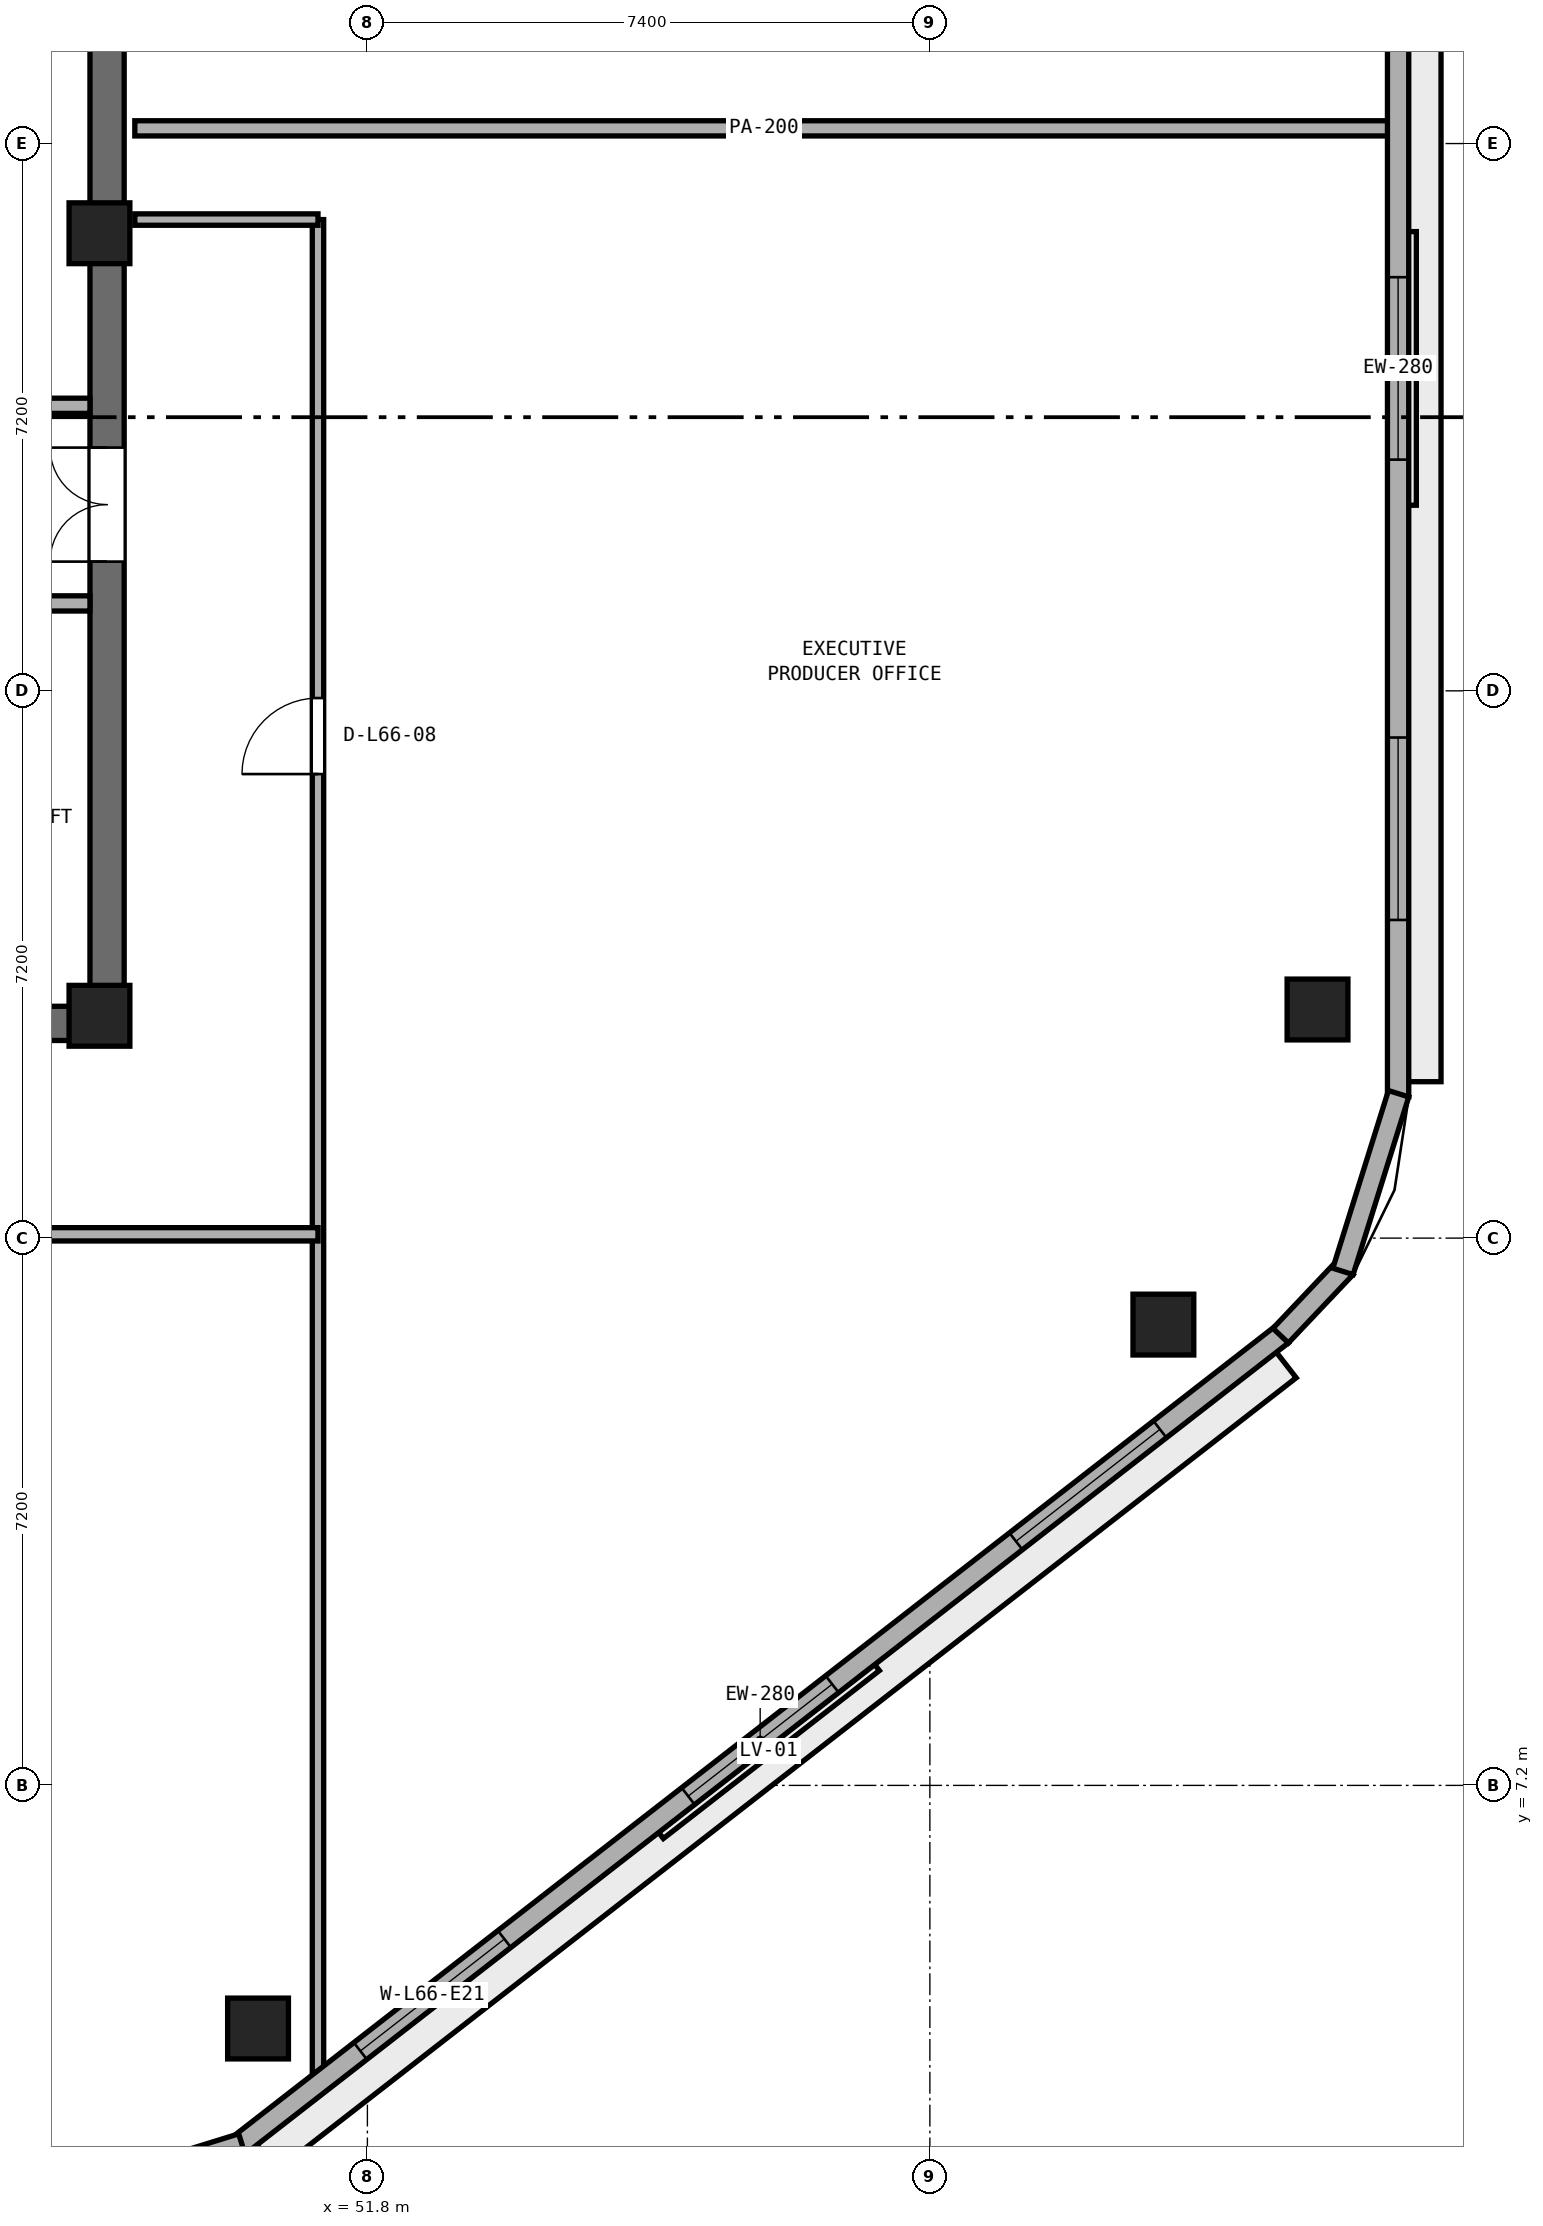
"""IFC4 building model, lengths in metres.
Left out: names, types, materials, properties, quantities, classifications, styles, units other than length and angle.
Written with IfcOpenShell. Run it as: python <this file> out.ifc"""

import sys

from ifc_helpers import new_model, si_unit, direction, frame, frame_2d, origin, origin_2d, place, context, subcontext, project, spatial, rectangle, extrude, element, fill, save


model = new_model("IFC4")
c1 = context("Model", 3, precision=1e-05, world=origin(), true_north=direction((0.0, 1.0)))
c2 = subcontext(c1, "Body", "Model", "MODEL_VIEW")
j1 = project(units=[si_unit("LENGTHUNIT", "METRE"), si_unit("PLANEANGLEUNIT", "RADIAN")], contexts=[c1])
p1 = place(None, origin())
s1 = spatial("IfcSite", under=j1, at=p1, CompositionType="ELEMENT")
p2 = place(p1, origin())
s2 = spatial("IfcBuilding", under=s1, at=p2, CompositionType="ELEMENT")
p3 = place(p2, frame((0.0, 0.0, 259.2)))
s3 = spatial("IfcBuildingStorey", under=s2, at=p3, CompositionType="ELEMENT", Elevation=259.2)
p4 = place(p3, frame((25.4, 17.225, 0.0), z_axis=(0.0, 0.0, 1.0), x_axis=(1.0, 0.0, 0.0)))
e1 = element("IfcWall", 1, at=p4, inside=s3, PredefinedType="SHEAR", context=c2, shape_type="SweptSolid", body=[
    extrude(rectangle(XDim=23.2, YDim=0.45, at=frame_2d((11.6, 0.0))), origin(), (0.0, 0.0, 1.0), 3.51),
])
p5 = place(p3, frame((48.375, 17.45, 0.0), z_axis=(0.0, 0.0, 1.0), x_axis=(0.0, 1.0, 0.0)))
e2 = element("IfcWall", 2, at=p5, inside=s3, PredefinedType="SHEAR", context=c2, shape_type="SweptSolid", body=[
    extrude(rectangle(XDim=15.5, YDim=0.45, at=frame_2d((7.75, 0.0))), origin(), (0.0, 0.0, 1.0), 3.51),
])
p6 = place(p5, frame((5.85, 0.0, 0.0)))
e3 = element("IfcOpeningElement", 3, at=p6, cuts=e2, PredefinedType="OPENING", context=c2, shape_type="SweptSolid", body=[
    extrude(rectangle(XDim=1.5, YDim=2.15, at=frame_2d((0.75, 1.075))), frame((0.0, 0.235, 0.0), z_axis=(0.0, -1.0, 0.0), x_axis=(1.0, 0.0, 0.0)), (0.0, 0.0, 1.0), 0.47),
])
for number, where, z_axis, x_axis in (
    (4, (48.275, 17.325, 0.0), (0.0, 0.0, 1.0), (1.0, 0.0, 0.0)),
    (5, (48.275, 27.62, 0.0), (0.0, 0.0, 1.0), (1.0, 0.0, 0.0)),
):
    element("IfcColumn", number, at=place(p3, frame(where, z_axis=z_axis, x_axis=x_axis)), inside=s3, PredefinedType="PILASTER", context=c2, shape_type="SweptSolid", body=[
        extrude(rectangle(XDim=0.8, YDim=0.8, at=origin_2d()), origin(), (0.0, 0.0, 1.0), 3.8),
    ])
for number, where, z_axis, x_axis in (
    (6, (50.361, 4.002, 0.0), (0.0, 0.0, 1.0), (1.0, 0.0, 0.0)),
    (7, (62.272, 13.262, 0.0), (0.0, 0.0, 1.0), (1.0, 0.0, 0.0)),
    (8, (64.3, 17.408, 0.0), (0.0, 0.0, 1.0), (1.0, 0.0, 0.0)),
):
    element("IfcColumn", number, at=place(p3, frame(where, z_axis=z_axis, x_axis=x_axis)), inside=s3, PredefinedType="COLUMN", context=c2, shape_type="SweptSolid", body=[
        extrude(rectangle(XDim=0.8, YDim=0.8, at=origin_2d()), origin(), (0.0, 0.0, 1.0), 3.8),
    ])
p7 = place(p3, frame((42.0, 22.75, 0.0), z_axis=(0.0, 0.0, 1.0), x_axis=(1.0, 0.0, 0.0)))
e9 = element("IfcWall", 9, at=p7, inside=s3, PredefinedType="SOLIDWALL", context=c2, shape_type="SweptSolid", body=[
    extrude(rectangle(XDim=6.15, YDim=0.2, at=frame_2d((3.075, 0.0))), origin(), (0.0, 0.0, 1.0), 3.51),
])
p8 = place(p3, frame((46.1, 25.35, 0.0), z_axis=(0.0, 0.0, 1.0), x_axis=(1.0, 0.0, 0.0)))
e10 = element("IfcWall", 10, at=p8, inside=s3, PredefinedType="SOLIDWALL", context=c2, shape_type="SweptSolid", body=[
    extrude(rectangle(XDim=2.05, YDim=0.2, at=frame_2d((1.025, 0.0))), origin(), (0.0, 0.0, 1.0), 3.51),
])
p9 = place(p3, frame((51.15, 3.235, 0.0), z_axis=(0.0, 0.0, 1.0), x_axis=(0.0, 1.0, 0.0)))
e11 = element("IfcWall", 11, at=p9, inside=s3, PredefinedType="PARTITIONING", context=c2, shape_type="SweptSolid", body=[
    extrude(rectangle(XDim=24.565, YDim=0.15, at=frame_2d((12.283, 0.0))), origin(), (0.0, 0.0, 1.0), 3.51),
])
p10 = place(p9, frame((17.27, 0.0, 0.0)))
e12 = element("IfcOpeningElement", 12, at=p10, cuts=e11, PredefinedType="OPENING", context=c2, shape_type="SweptSolid", body=[
    extrude(rectangle(XDim=1.0, YDim=2.12, at=frame_2d((0.5, 1.06))), frame((0.0, 0.085, 0.0), z_axis=(0.0, -1.0, 0.0), x_axis=(1.0, 0.0, 0.0)), (0.0, 0.0, 1.0), 0.17),
])
p11 = place(p3, frame((38.35, 14.45, 0.0), z_axis=(0.0, 0.0, 1.0), x_axis=(1.0, 0.0, 0.0)))
e13 = element("IfcWall", 13, at=p11, inside=s3, PredefinedType="PARTITIONING", context=c2, shape_type="SweptSolid", body=[
    extrude(rectangle(XDim=12.8, YDim=0.175, at=frame_2d((6.4, 0.0))), origin(), (0.0, 0.0, 1.0), 3.51),
])
p12 = place(p11, frame((5.9, 0.0, 0.0)))
e14 = element("IfcOpeningElement", 14, at=p12, cuts=e13, PredefinedType="OPENING", context=c2, shape_type="SweptSolid", body=[
    extrude(rectangle(XDim=1.0, YDim=2.12, at=frame_2d((0.5, 1.06))), frame((0.0, 0.097, 0.0), z_axis=(0.0, -1.0, 0.0), x_axis=(1.0, 0.0, 0.0)), (0.0, 0.0, 1.0), 0.195),
])
p13 = place(p3, frame((48.74, 27.8, 0.0), z_axis=(0.0, 0.0, 1.0), x_axis=(1.0, 0.0, 0.0)))
e15 = element("IfcWall", 15, at=p13, inside=s3, PredefinedType="PARTITIONING", context=c2, shape_type="SweptSolid", body=[
    extrude(rectangle(XDim=2.41, YDim=0.15, at=frame_2d((1.205, 0.0))), origin(), (0.0, 0.0, 1.0), 3.51),
])
p14 = place(p3, frame((48.74, 29.0, 0.0), z_axis=(0.0, 0.0, 1.0), x_axis=(1.0, 0.0, 0.0)))
e16 = element("IfcWall", 16, at=p14, inside=s3, PredefinedType="PARTITIONING", context=c2, shape_type="SweptSolid", body=[
    extrude(rectangle(XDim=16.555, YDim=0.2, at=frame_2d((8.277, 0.0))), origin(), (0.0, 0.0, 1.0), 3.51),
])
p15 = place(p3, frame((50.104, 2.459, 0.0), z_axis=(0.0, 0.0, 1.0), x_axis=(0.789464857485, 0.613795763097, 0.0)))
e17 = element("IfcWall", 17, at=p15, inside=s3, PredefinedType="STANDARD", context=c2, shape_type="SweptSolid", body=[
    extrude(rectangle(XDim=17.387, YDim=0.28, at=frame_2d((8.694, 0.0))), origin(), (0.0, 0.0, 1.0), 3.51),
])
p16 = place(p15, frame((2.031, 0.0, 0.9)))
e18 = element("IfcOpeningElement", 18, at=p16, cuts=e17, PredefinedType="OPENING", context=c2, shape_type="SweptSolid", body=[
    extrude(rectangle(XDim=2.4, YDim=1.75, at=frame_2d((1.2, 0.875))), frame((0.0, 0.15, 0.0), z_axis=(0.0, -1.0, 0.0), x_axis=(1.0, 0.0, 0.0)), (0.0, 0.0, 1.0), 0.3),
])
p17 = place(p15, frame((7.494, 0.0, 0.9)))
e19 = element("IfcOpeningElement", 19, at=p17, cuts=e17, PredefinedType="OPENING", context=c2, shape_type="SweptSolid", body=[
    extrude(rectangle(XDim=2.4, YDim=1.75, at=frame_2d((1.2, 0.875))), frame((0.0, 0.15, 0.0), z_axis=(0.0, -1.0, 0.0), x_axis=(1.0, 0.0, 0.0)), (0.0, 0.0, 1.0), 0.3),
])
p18 = place(p15, frame((12.956, 0.0, 0.9)))
e20 = element("IfcOpeningElement", 20, at=p18, cuts=e17, PredefinedType="OPENING", context=c2, shape_type="SweptSolid", body=[
    extrude(rectangle(XDim=2.4, YDim=1.75, at=frame_2d((1.2, 0.875))), frame((0.0, 0.15, 0.0), z_axis=(0.0, -1.0, 0.0), x_axis=(1.0, 0.0, 0.0)), (0.0, 0.0, 1.0), 0.3),
])
p19 = place(p3, frame((65.36, 16.258, 0.0), z_axis=(0.0, 0.0, 1.0), x_axis=(0.0, 1.0, 0.0)))
e21 = element("IfcWall", 21, at=p19, inside=s3, PredefinedType="STANDARD", context=c2, shape_type="SweptSolid", body=[
    extrude(rectangle(XDim=19.168, YDim=0.28, at=frame_2d((9.584, 0.0))), origin(), (0.0, 0.0, 1.0), 3.51),
])
p20 = place(p19, frame((2.328, 0.0, 0.9)))
e22 = element("IfcOpeningElement", 22, at=p20, cuts=e21, PredefinedType="OPENING", context=c2, shape_type="SweptSolid", body=[
    extrude(rectangle(XDim=2.4, YDim=1.75, at=frame_2d((1.2, 0.875))), frame((0.0, 0.15, 0.0), z_axis=(0.0, -1.0, 0.0), x_axis=(1.0, 0.0, 0.0)), (0.0, 0.0, 1.0), 0.3),
])
p21 = place(p19, frame((8.384, 0.0, 0.9)))
e23 = element("IfcOpeningElement", 23, at=p21, cuts=e21, PredefinedType="OPENING", context=c2, shape_type="SweptSolid", body=[
    extrude(rectangle(XDim=2.4, YDim=1.75, at=frame_2d((1.2, 0.875))), frame((0.0, 0.15, 0.0), z_axis=(0.0, -1.0, 0.0), x_axis=(1.0, 0.0, 0.0)), (0.0, 0.0, 1.0), 0.3),
])
p22 = place(p19, frame((14.44, 0.0, 0.9)))
e24 = element("IfcOpeningElement", 24, at=p22, cuts=e21, PredefinedType="OPENING", context=c2, shape_type="SweptSolid", body=[
    extrude(rectangle(XDim=2.4, YDim=1.75, at=frame_2d((1.2, 0.875))), frame((0.0, 0.15, 0.0), z_axis=(0.0, -1.0, 0.0), x_axis=(1.0, 0.0, 0.0)), (0.0, 0.0, 1.0), 0.3),
])
p23 = place(p3, frame((47.386, 1.626, 0.0), z_axis=(0.0, 0.0, 1.0), x_axis=(0.955189316149, 0.29599555793, 0.0)))
e25 = element("IfcWall", 25, at=p23, inside=s3, PredefinedType="STANDARD", context=c2, shape_type="SweptSolid", body=[
    extrude(rectangle(XDim=2.892, YDim=0.28, at=frame_2d((1.446, 0.0))), origin(), (0.0, 0.0, 1.0), 3.51),
])
p24 = place(p3, frame((63.815, 13.117, 0.0), z_axis=(0.0, 0.0, 1.0), x_axis=(0.687733716128, 0.725963040176, 0.0)))
e26 = element("IfcWall", 26, at=p24, inside=s3, PredefinedType="STANDARD", context=c2, shape_type="SweptSolid", body=[
    extrude(rectangle(XDim=1.239, YDim=0.28, at=frame_2d((0.62, 0.0))), origin(), (0.0, 0.0, 1.0), 3.51),
])
p25 = place(p3, frame((64.635, 13.962, 0.0), z_axis=(0.0, 0.0, 1.0), x_axis=(0.298649578722, 0.954362839348, 0.0)))
e27 = element("IfcWall", 27, at=p25, inside=s3, PredefinedType="STANDARD", context=c2, shape_type="SweptSolid", body=[
    extrude(rectangle(XDim=2.449, YDim=0.28, at=frame_2d((1.225, 0.0))), origin(), (0.0, 0.0, 1.0), 3.51),
])
p26 = place(p6, origin())
e28 = element("IfcDoor", 28, at=p26, inside=s3, OperationType="DOUBLE_DOOR_SINGLE_SWING", PredefinedType="DOOR", context=c2, shape_type="SweptSolid", body=[
    extrude(rectangle(XDim=1.5, YDim=2.15, at=frame_2d((0.75, 1.075))), frame((0.0, 0.025, 0.0), z_axis=(0.0, -1.0, 0.0), x_axis=(1.0, 0.0, 0.0)), (0.0, 0.0, 1.0), 0.05),
])
fill(e3, e28)
p27 = place(p10, origin())
e29 = element("IfcDoor", 29, at=p27, inside=s3, OperationType="SINGLE_SWING_LEFT", PredefinedType="DOOR", context=c2, shape_type="SweptSolid", body=[
    extrude(rectangle(XDim=1.0, YDim=2.12, at=frame_2d((0.5, 1.06))), frame((0.0, 0.025, 0.0), z_axis=(0.0, -1.0, 0.0), x_axis=(1.0, 0.0, 0.0)), (0.0, 0.0, 1.0), 0.05),
])
fill(e12, e29)
p28 = place(p16, origin())
e30 = element("IfcWindow", 30, at=p28, inside=s3, PartitioningType="SINGLE_PANEL", PredefinedType="WINDOW", context=c2, shape_type="SweptSolid", body=[
    extrude(rectangle(XDim=2.4, YDim=1.75, at=frame_2d((1.2, 0.875))), frame((0.0, 0.03, 0.0), z_axis=(0.0, -1.0, 0.0), x_axis=(1.0, 0.0, 0.0)), (0.0, 0.0, 1.0), 0.06),
])
fill(e18, e30)
p29 = place(p17, origin())
e31 = element("IfcWindow", 31, at=p29, inside=s3, PartitioningType="SINGLE_PANEL", PredefinedType="WINDOW", context=c2, shape_type="SweptSolid", body=[
    extrude(rectangle(XDim=2.4, YDim=1.75, at=frame_2d((1.2, 0.875))), frame((0.0, 0.03, 0.0), z_axis=(0.0, -1.0, 0.0), x_axis=(1.0, 0.0, 0.0)), (0.0, 0.0, 1.0), 0.06),
])
fill(e19, e31)
p30 = place(p18, origin())
e32 = element("IfcWindow", 32, at=p30, inside=s3, PartitioningType="SINGLE_PANEL", PredefinedType="WINDOW", context=c2, shape_type="SweptSolid", body=[
    extrude(rectangle(XDim=2.4, YDim=1.75, at=frame_2d((1.2, 0.875))), frame((0.0, 0.03, 0.0), z_axis=(0.0, -1.0, 0.0), x_axis=(1.0, 0.0, 0.0)), (0.0, 0.0, 1.0), 0.06),
])
fill(e20, e32)
p31 = place(p20, origin())
e33 = element("IfcWindow", 33, at=p31, inside=s3, PartitioningType="SINGLE_PANEL", PredefinedType="WINDOW", context=c2, shape_type="SweptSolid", body=[
    extrude(rectangle(XDim=2.4, YDim=1.75, at=frame_2d((1.2, 0.875))), frame((0.0, 0.03, 0.0), z_axis=(0.0, -1.0, 0.0), x_axis=(1.0, 0.0, 0.0)), (0.0, 0.0, 1.0), 0.06),
])
fill(e22, e33)
p32 = place(p21, origin())
e34 = element("IfcWindow", 34, at=p32, inside=s3, PartitioningType="SINGLE_PANEL", PredefinedType="WINDOW", context=c2, shape_type="SweptSolid", body=[
    extrude(rectangle(XDim=2.4, YDim=1.75, at=frame_2d((1.2, 0.875))), frame((0.0, 0.03, 0.0), z_axis=(0.0, -1.0, 0.0), x_axis=(1.0, 0.0, 0.0)), (0.0, 0.0, 1.0), 0.06),
])
fill(e23, e34)
save(model, sys.argv[1])
